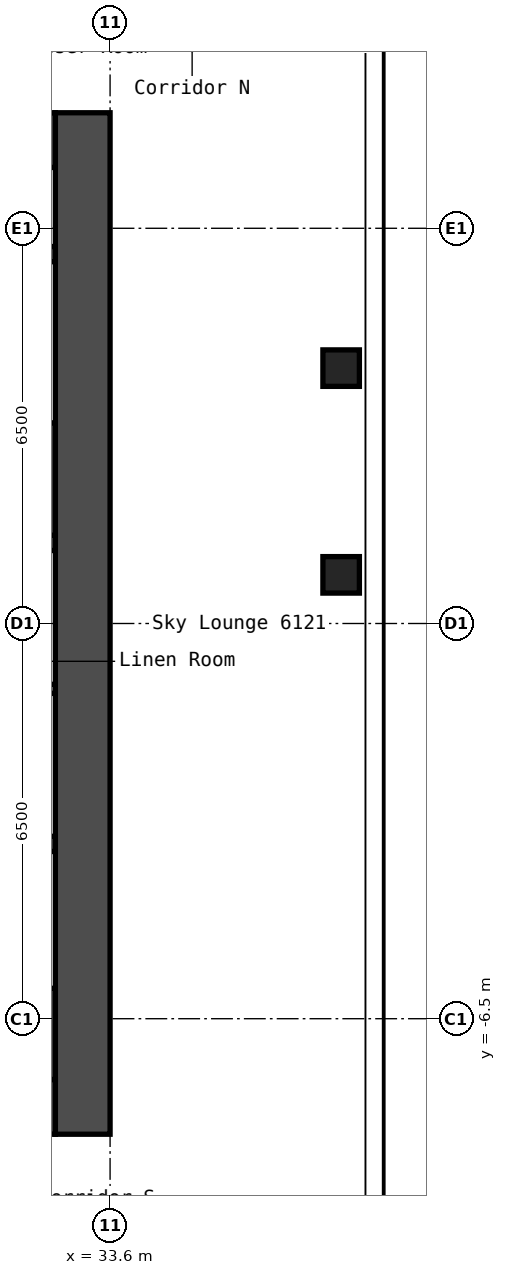
"""IFC4 building model, lengths in metres.
Left out: names, types, materials, properties, quantities, classifications, styles, units other than length and angle.
Written with IfcOpenShell. Run it as: python <this file> out.ifc"""

import sys

from ifc_helpers import new_model, si_unit, direction, frame, frame_2d, origin, origin_2d, place, context, subcontext, project, spatial, rectangle, hollow_rectangle, extrude, element, save


model = new_model("IFC4")
c1 = context("Model", 3, precision=1e-05, world=origin(), true_north=direction((0.0, 1.0)))
c2 = subcontext(c1, "Body", "Model", "MODEL_VIEW")
j1 = project(units=[si_unit("LENGTHUNIT", "METRE"), si_unit("PLANEANGLEUNIT", "RADIAN")], contexts=[c1])
p1 = place(None, origin())
s1 = spatial("IfcSite", under=j1, at=p1, CompositionType="ELEMENT")
p2 = place(p1, origin())
s2 = spatial("IfcBuilding", under=s1, at=p2, CompositionType="ELEMENT")
p3 = place(p2, frame((0.0, 0.0, 215.4)))
s3 = spatial("IfcBuildingStorey", under=s2, at=p3, CompositionType="ELEMENT", Elevation=215.4)
for number, where, z_axis, x_axis in (
    (1, (37.4, 0.8, 0.0), (0.0, 0.0, 1.0), (1.0, 0.0, 0.0)),
    (2, (37.4, 4.2, 0.0), (0.0, 0.0, 1.0), (1.0, 0.0, 0.0)),
):
    element("IfcColumn", number, at=place(p3, frame(where, z_axis=z_axis, x_axis=x_axis)), inside=s3, PredefinedType="COLUMN", context=c2, shape_type="SweptSolid", body=[
        extrude(hollow_rectangle(XDim=0.6, YDim=0.6, WallThickness=0.025, InnerFilletRadius=0.038, OuterFilletRadius=0.062, at=origin_2d()), origin(), (0.0, 0.0, 1.0), 2.75),
    ])
p4 = place(p3, frame((33.15, -8.4, 0.0), z_axis=(0.0, 0.0, 1.0), x_axis=(0.0, 1.0, 0.0)))
e3 = element("IfcWall", 3, at=p4, inside=s3, PredefinedType="SHEAR", context=c2, shape_type="SweptSolid", body=[
    extrude(rectangle(XDim=16.8, YDim=0.9, at=frame_2d((8.4, 0.0))), origin(), (0.0, 0.0, 1.0), 2.75),
])
p5 = place(p3, frame((17.7, 7.95, 0.0), z_axis=(0.0, 0.0, 1.0), x_axis=(1.0, 0.0, 0.0)))
e4 = element("IfcWall", 4, at=p5, inside=s3, PredefinedType="SHEAR", context=c2, shape_type="SweptSolid", body=[
    extrude(rectangle(XDim=15.0, YDim=0.9, at=frame_2d((7.5, 0.0))), origin(), (0.0, 0.0, 1.0), 2.75),
])
p6 = place(p5, frame((10.4, 0.0, 0.0)))
e5 = element("IfcOpeningElement", 5, at=p6, cuts=e4, PredefinedType="OPENING", context=c2, shape_type="SweptSolid", body=[
    extrude(rectangle(XDim=1.2, YDim=2.1, at=frame_2d((0.6, 1.05))), frame((0.0, 0.46, 0.0), z_axis=(0.0, -1.0, 0.0), x_axis=(1.0, 0.0, 0.0)), (0.0, 0.0, 1.0), 0.92),
])
p7 = place(p5, frame((13.35, 0.0, 0.0)))
e6 = element("IfcOpeningElement", 6, at=p7, cuts=e4, PredefinedType="OPENING", context=c2, shape_type="SweptSolid", body=[
    extrude(rectangle(XDim=0.9, YDim=2.1, at=frame_2d((0.45, 1.05))), frame((0.0, 0.46, 0.0), z_axis=(0.0, -1.0, 0.0), x_axis=(1.0, 0.0, 0.0)), (0.0, 0.0, 1.0), 0.92),
])
p8 = place(p3, frame((17.7, -7.95, 0.0), z_axis=(0.0, 0.0, 1.0), x_axis=(1.0, 0.0, 0.0)))
e7 = element("IfcWall", 7, at=p8, inside=s3, PredefinedType="SHEAR", context=c2, shape_type="SweptSolid", body=[
    extrude(rectangle(XDim=15.0, YDim=0.9, at=frame_2d((7.5, 0.0))), origin(), (0.0, 0.0, 1.0), 2.75),
])
p9 = place(p8, frame((2.55, 0.0, 0.0)))
e8 = element("IfcOpeningElement", 8, at=p9, cuts=e7, PredefinedType="OPENING", context=c2, shape_type="SweptSolid", body=[
    extrude(rectangle(XDim=1.0, YDim=2.1, at=frame_2d((0.5, 1.05))), frame((0.0, 0.46, 0.0), z_axis=(0.0, -1.0, 0.0), x_axis=(1.0, 0.0, 0.0)), (0.0, 0.0, 1.0), 0.92),
])
p10 = place(p3, frame((27.65, 1.325, 0.0), z_axis=(0.0, 0.0, 1.0), x_axis=(1.0, 0.0, 0.0)))
e9 = element("IfcWall", 9, at=p10, inside=s3, PredefinedType="SHEAR", context=c2, shape_type="SweptSolid", body=[
    extrude(rectangle(XDim=5.05, YDim=0.25, at=frame_2d((2.525, 0.0))), origin(), (0.0, 0.0, 1.0), 2.75),
])
p11 = place(p10, frame((0.55, 0.0, 0.0)))
e10 = element("IfcOpeningElement", 10, at=p11, cuts=e9, PredefinedType="OPENING", context=c2, shape_type="SweptSolid", body=[
    extrude(rectangle(XDim=1.2, YDim=2.1, at=frame_2d((0.6, 1.05))), frame((0.0, 0.135, 0.0), z_axis=(0.0, -1.0, 0.0), x_axis=(1.0, 0.0, 0.0)), (0.0, 0.0, 1.0), 0.27),
])
p12 = place(p3, frame((30.3, 2.375, 0.0), z_axis=(0.0, 0.0, 1.0), x_axis=(1.0, 0.0, 0.0)))
e11 = element("IfcWall", 11, at=p12, inside=s3, PredefinedType="SHEAR", context=c2, shape_type="SweptSolid", body=[
    extrude(rectangle(XDim=2.4, YDim=1.85, at=frame_2d((1.2, 0.0))), origin(), (0.0, 0.0, 1.0), 2.75),
])
p13 = place(p3, frame((30.3, 6.075, 0.0), z_axis=(0.0, 0.0, 1.0), x_axis=(1.0, 0.0, 0.0)))
e12 = element("IfcWall", 12, at=p13, inside=s3, PredefinedType="SHEAR", context=c2, shape_type="SweptSolid", body=[
    extrude(rectangle(XDim=2.4, YDim=0.25, at=frame_2d((1.2, 0.0))), origin(), (0.0, 0.0, 1.0), 2.75),
])
p14 = place(p3, frame((28.15, -3.625, 0.0), z_axis=(0.0, 0.0, 1.0), x_axis=(1.0, 0.0, 0.0)))
e13 = element("IfcWall", 13, at=p14, inside=s3, PredefinedType="SHEAR", context=c2, shape_type="SweptSolid", body=[
    extrude(rectangle(XDim=4.55, YDim=0.25, at=frame_2d((2.275, 0.0))), origin(), (0.0, 0.0, 1.0), 2.75),
])
p15 = place(p3, frame((28.15, -6.75, 0.0), z_axis=(0.0, 0.0, 1.0), x_axis=(1.0, 0.0, 0.0)))
e14 = element("IfcWall", 14, at=p15, inside=s3, PredefinedType="SHEAR", context=c2, shape_type="SweptSolid", body=[
    extrude(rectangle(XDim=4.55, YDim=1.5, at=frame_2d((2.275, 0.0))), origin(), (0.0, 0.0, 1.0), 2.75),
])
p16 = place(p3, frame((29.7, -1.075, 0.0), z_axis=(0.0, 0.0, 1.0), x_axis=(1.0, 0.0, 0.0)))
e15 = element("IfcWall", 15, at=p16, inside=s3, PredefinedType="PARTITIONING", context=c2, shape_type="SweptSolid", body=[
    extrude(rectangle(XDim=3.0, YDim=0.15, at=frame_2d((1.5, 0.0))), origin(), (0.0, 0.0, 1.0), 2.75),
])
save(model, sys.argv[1])
